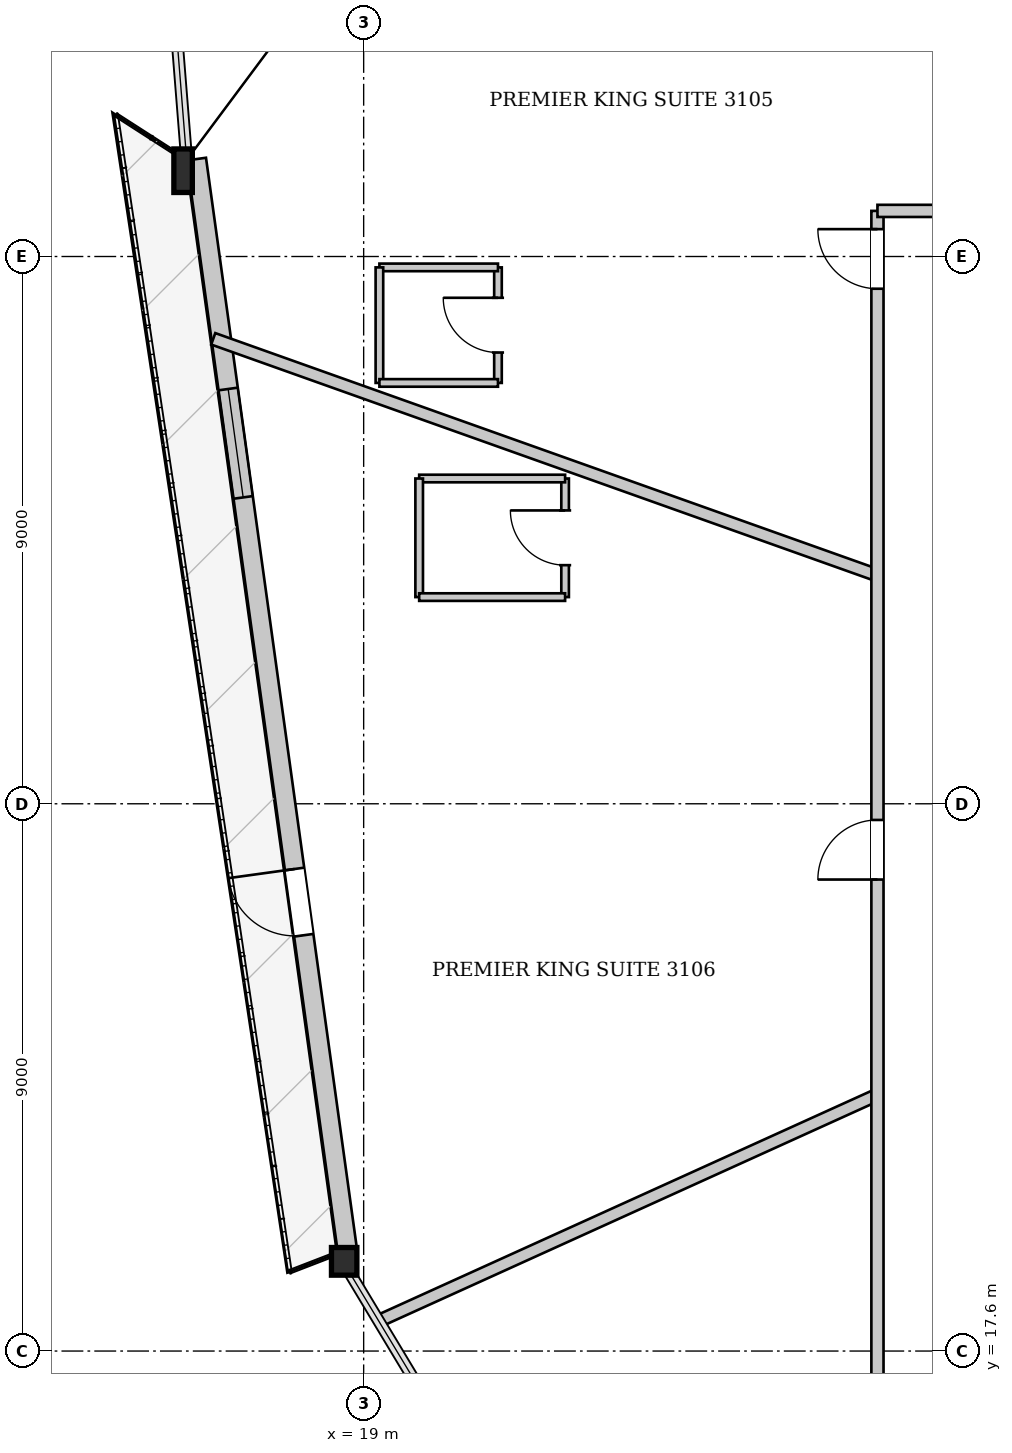
"""IFC4 building model, lengths in metres.
Left out: names, types, materials, properties, quantities, classifications, styles, units other than length and angle.
Written with IfcOpenShell. Run it as: python <this file> out.ifc"""

import sys

from ifc_helpers import new_model, si_unit, direction, frame, frame_2d, origin, origin_2d, place, context, subcontext, project, spatial, rectangle, i_section, extrude, source, transform, mapped, element, fill, save


model = new_model("IFC4")
c1 = context("Model", 3, precision=1e-05, world=origin(), true_north=direction((0.0, 1.0)))
c2 = subcontext(c1, "Body", "Model", "MODEL_VIEW")
j1 = project(units=[si_unit("LENGTHUNIT", "METRE"), si_unit("PLANEANGLEUNIT", "RADIAN")], contexts=[c1])
p1 = place(None, origin())
s1 = spatial("IfcSite", under=j1, at=p1, CompositionType="ELEMENT")
p2 = place(p1, origin())
s2 = spatial("IfcBuilding", under=s1, at=p2, CompositionType="ELEMENT")
p3 = place(p2, frame((0.0, 0.0, 119.9)))
s3 = spatial("IfcBuildingStorey", under=s2, at=p3, CompositionType="ELEMENT", Elevation=119.9)
m1 = source(origin(), c2, "Body", "SweptSolid", [
    extrude(i_section(OverallWidth=0.304, OverallDepth=0.716, WebThickness=0.021, FlangeThickness=0.04, at=origin_2d()), origin(), (0.0, 0.0, 1.0), 3.404),
])
p4 = place(p3, frame((16.09, 37.18, 0.0), z_axis=(-0.035071915278, -0.099478009184, 0.994421483299), x_axis=(0.94310325707, -0.332499994742, 0.0)))
e1 = element("IfcColumn", 1, at=p4, inside=s3, PredefinedType="COLUMN", context=c2, shape_type="MappedRepresentation", body=[
    mapped(m1, transform((0.0, 0.0, 0.0), x_axis=(1.0, 0.0, 0.0), y_axis=(0.0, 1.0, 0.0), z_axis=(0.0, 0.0, 1.0), scale=1.0)),
])
m2 = source(origin(), c2, "Body", "SweptSolid", [
    extrude(i_section(OverallWidth=0.418, OverallDepth=0.455, WebThickness=0.038, FlangeThickness=0.059, at=origin_2d()), origin(), (0.0, 0.0, 1.0), 3.402),
])
p5 = place(p3, frame((18.576, 19.21, 0.0), z_axis=(0.060711197165, -0.079441247354, 0.994989064642), x_axis=(0.794541150271, 0.607210309963, 0.0)))
e2 = element("IfcColumn", 2, at=p5, inside=s3, PredefinedType="COLUMN", context=c2, shape_type="MappedRepresentation", body=[
    mapped(m2, transform((0.0, 0.0, 0.0), x_axis=(1.0, 0.0, 0.0), y_axis=(0.0, 1.0, 0.0), z_axis=(0.0, 0.0, 1.0), scale=1.0)),
])
p6 = place(p3, frame((18.735, 19.232, 0.0), z_axis=(0.0, 0.0, 1.0), x_axis=(-0.137044979398, 0.990564825553, 0.0)))
e3 = element("IfcWall", 3, at=p6, inside=s3, PredefinedType="SOLIDWALL", context=c2, shape_type="SweptSolid", body=[
    extrude(rectangle(XDim=18.141, YDim=0.32, at=frame_2d((9.07, 0.0))), origin(), (0.0, 0.0, 1.0), 2.692),
])
p7 = place(p6, frame((5.255, 0.0, 0.0)))
e4 = element("IfcOpeningElement", 4, at=p7, cuts=e3, PredefinedType="OPENING", context=c2, shape_type="SweptSolid", body=[
    extrude(rectangle(XDim=1.1, YDim=2.3, at=frame_2d((0.55, 1.15))), frame((0.0, 0.17, 0.0), z_axis=(0.0, -1.0, 0.0), x_axis=(1.0, 0.0, 0.0)), (0.0, 0.0, 1.0), 0.34),
])
p8 = place(p6, frame((12.524, 0.0, 0.372)))
e5 = element("IfcOpeningElement", 5, at=p8, cuts=e3, PredefinedType="OPENING", context=c2, shape_type="SweptSolid", body=[
    extrude(rectangle(XDim=1.8, YDim=2.2, at=frame_2d((0.9, 1.1))), frame((0.0, 0.17, 0.0), z_axis=(0.0, -1.0, 0.0), x_axis=(1.0, 0.0, 0.0)), (0.0, 0.0, 1.0), 0.34),
])
p9 = place(p3, frame((27.45, 30.357, 0.0), z_axis=(0.0, 0.0, 1.0), x_axis=(-0.942054935906, 0.335458637891, 0.0)))
e6 = element("IfcWall", 6, at=p9, inside=s3, PredefinedType="PARTITIONING", context=c2, shape_type="SweptSolid", body=[
    extrude(rectangle(XDim=11.596, YDim=0.2, at=frame_2d((5.798, 0.0))), origin(), (0.0, 0.0, 1.0), 3.3),
])
p10 = place(p3, frame((27.45, 21.814, 0.0), z_axis=(0.0, 0.0, 1.0), x_axis=(-0.910689415533, -0.413091743366, 0.0)))
e7 = element("IfcWall", 7, at=p10, inside=s3, PredefinedType="PARTITIONING", context=c2, shape_type="SweptSolid", body=[
    extrude(rectangle(XDim=8.976, YDim=0.2, at=frame_2d((4.488, 0.0))), origin(), (0.0, 0.0, 1.0), 3.3),
])
p11 = place(p3, frame((21.209, 33.521, 0.0), z_axis=(0.0, 0.0, 1.0), x_axis=(0.0, 1.0, 0.0)))
e8 = element("IfcWall", 8, at=p11, inside=s3, PredefinedType="PARTITIONING", context=c2, shape_type="SweptSolid", body=[
    extrude(rectangle(XDim=1.9, YDim=0.125, at=frame_2d((0.95, 0.0))), origin(), (0.0, 0.0, 1.0), 3.3),
])
p12 = place(p11, frame((0.5, 0.0, 0.0)))
e9 = element("IfcOpeningElement", 9, at=p12, cuts=e8, PredefinedType="OPENING", context=c2, shape_type="SweptSolid", body=[
    extrude(rectangle(XDim=0.9, YDim=2.1, at=frame_2d((0.45, 1.05))), frame((0.0, 0.073, 0.0), z_axis=(0.0, -1.0, 0.0), x_axis=(1.0, 0.0, 0.0)), (0.0, 0.0, 1.0), 0.145),
])
p13 = place(p3, frame((21.209, 35.421, 0.0), z_axis=(0.0, 0.0, 1.0), x_axis=(-1.0, 0.0, 0.0)))
e10 = element("IfcWall", 10, at=p13, inside=s3, PredefinedType="PARTITIONING", context=c2, shape_type="SweptSolid", body=[
    extrude(rectangle(XDim=1.95, YDim=0.125, at=frame_2d((0.975, 0.0))), origin(), (0.0, 0.0, 1.0), 2.975),
])
p14 = place(p3, frame((19.259, 35.421, 0.0), z_axis=(0.0, 0.0, 1.0), x_axis=(0.0, -1.0, 0.0)))
e11 = element("IfcWall", 11, at=p14, inside=s3, PredefinedType="PARTITIONING", context=c2, shape_type="SweptSolid", body=[
    extrude(rectangle(XDim=1.9, YDim=0.125, at=frame_2d((0.95, 0.0))), origin(), (0.0, 0.0, 1.0), 3.3),
])
p15 = place(p3, frame((19.259, 33.521, 0.0), z_axis=(0.0, 0.0, 1.0), x_axis=(1.0, 0.0, 0.0)))
e12 = element("IfcWall", 12, at=p15, inside=s3, PredefinedType="PARTITIONING", context=c2, shape_type="SweptSolid", body=[
    extrude(rectangle(XDim=1.95, YDim=0.125, at=frame_2d((0.975, 0.0))), origin(), (0.0, 0.0, 1.0), 3.3),
])
p16 = place(p3, frame((22.313, 29.999, 0.0), z_axis=(0.0, 0.0, 1.0), x_axis=(0.0, 1.0, 0.0)))
e13 = element("IfcWall", 13, at=p16, inside=s3, PredefinedType="PARTITIONING", context=c2, shape_type="SweptSolid", body=[
    extrude(rectangle(XDim=1.95, YDim=0.125, at=frame_2d((0.975, 0.0))), origin(), (0.0, 0.0, 1.0), 3.045),
])
p17 = place(p16, frame((0.525, 0.0, 0.0)))
e14 = element("IfcOpeningElement", 14, at=p17, cuts=e13, PredefinedType="OPENING", context=c2, shape_type="SweptSolid", body=[
    extrude(rectangle(XDim=0.9, YDim=2.1, at=frame_2d((0.45, 1.05))), frame((0.0, 0.073, 0.0), z_axis=(0.0, -1.0, 0.0), x_axis=(1.0, 0.0, 0.0)), (0.0, 0.0, 1.0), 0.145),
])
p18 = place(p3, frame((22.313, 31.949, 0.0), z_axis=(0.0, 0.0, 1.0), x_axis=(-1.0, 0.0, 0.0)))
e15 = element("IfcWall", 15, at=p18, inside=s3, PredefinedType="PARTITIONING", context=c2, shape_type="SweptSolid", body=[
    extrude(rectangle(XDim=2.4, YDim=0.125, at=frame_2d((1.2, 0.0))), origin(), (0.0, 0.0, 1.0), 3.3),
])
p19 = place(p3, frame((19.913, 31.949, 0.0), z_axis=(0.0, 0.0, 1.0), x_axis=(0.0, -1.0, 0.0)))
e16 = element("IfcWall", 16, at=p19, inside=s3, PredefinedType="PARTITIONING", context=c2, shape_type="SweptSolid", body=[
    extrude(rectangle(XDim=1.95, YDim=0.125, at=frame_2d((0.975, 0.0))), origin(), (0.0, 0.0, 1.0), 3.3),
])
p20 = place(p3, frame((19.913, 29.999, 0.0), z_axis=(0.0, 0.0, 1.0), x_axis=(1.0, 0.0, 0.0)))
e17 = element("IfcWall", 17, at=p20, inside=s3, PredefinedType="PARTITIONING", context=c2, shape_type="SweptSolid", body=[
    extrude(rectangle(XDim=2.4, YDim=0.125, at=frame_2d((1.2, 0.0))), origin(), (0.0, 0.0, 1.0), 3.3),
])
p21 = place(p3, frame((27.45, 16.85, 0.0), z_axis=(0.0, 0.0, 1.0), x_axis=(0.0, 1.0, 0.0)))
e18 = element("IfcWall", 18, at=p21, inside=s3, PredefinedType="PARTITIONING", context=c2, shape_type="SweptSolid", body=[
    extrude(rectangle(XDim=19.5, YDim=0.2, at=frame_2d((9.75, 0.0))), origin(), (0.0, 0.0, 1.0), 3.3),
])
p22 = place(p21, frame((18.22, 0.0, 0.0)))
e19 = element("IfcOpeningElement", 19, at=p22, cuts=e18, PredefinedType="OPENING", context=c2, shape_type="SweptSolid", body=[
    extrude(rectangle(XDim=0.98, YDim=2.15, at=frame_2d((0.49, 1.075))), frame((0.0, 0.11, 0.0), z_axis=(0.0, -1.0, 0.0), x_axis=(1.0, 0.0, 0.0)), (0.0, 0.0, 1.0), 0.22),
])
p23 = place(p21, frame((8.504, 0.0, 0.0)))
e20 = element("IfcOpeningElement", 20, at=p23, cuts=e18, PredefinedType="OPENING", context=c2, shape_type="SweptSolid", body=[
    extrude(rectangle(XDim=0.98, YDim=2.15, at=frame_2d((0.49, 1.075))), frame((0.0, 0.11, 0.0), z_axis=(0.0, -1.0, 0.0), x_axis=(1.0, 0.0, 0.0)), (0.0, 0.0, 1.0), 0.22),
])
p24 = place(p3, frame((27.45, 36.35, 0.0), z_axis=(0.0, 0.0, 1.0), x_axis=(1.0, 0.0, 0.0)))
e21 = element("IfcWall", 21, at=p24, inside=s3, PredefinedType="PARTITIONING", context=c2, shape_type="SweptSolid", body=[
    extrude(rectangle(XDim=21.1, YDim=0.2, at=frame_2d((10.55, 0.0))), origin(), (0.0, 0.0, 1.0), 3.3),
])
p25 = place(p24, frame((19.579, 0.0, 0.0)))
e22 = element("IfcOpeningElement", 22, at=p25, cuts=e21, PredefinedType="OPENING", context=c2, shape_type="SweptSolid", body=[
    extrude(rectangle(XDim=0.98, YDim=2.15, at=frame_2d((0.49, 1.075))), frame((0.0, 0.11, 0.0), z_axis=(0.0, -1.0, 0.0), x_axis=(1.0, 0.0, 0.0)), (0.0, 0.0, 1.0), 0.22),
])
p26 = place(p24, frame((10.375, 0.0, 0.0)))
e23 = element("IfcOpeningElement", 23, at=p26, cuts=e21, PredefinedType="OPENING", context=c2, shape_type="SweptSolid", body=[
    extrude(rectangle(XDim=0.98, YDim=2.15, at=frame_2d((0.49, 1.075))), frame((0.0, 0.11, 0.0), z_axis=(0.0, -1.0, 0.0), x_axis=(1.0, 0.0, 0.0)), (0.0, 0.0, 1.0), 0.22),
])
m3 = source(origin(), c2, "Body", "SweptSolid", [
    extrude(rectangle(XDim=1.1, YDim=2.3, at=frame_2d((0.55, 1.15))), frame((0.0, 0.025, 0.0), z_axis=(0.0, -1.0, 0.0), x_axis=(1.0, 0.0, 0.0)), (0.0, 0.0, 1.0), 0.05),
])
p27 = place(p7, origin())
e24 = element("IfcDoor", 24, at=p27, inside=s3, OperationType="SINGLE_SWING_RIGHT", PredefinedType="DOOR", context=c2, shape_type="MappedRepresentation", body=[
    mapped(m3, transform((0.0, 0.0, 0.0), x_axis=(1.0, 0.0, 0.0), y_axis=(0.0, 1.0, 0.0), z_axis=(0.0, 0.0, 1.0), scale=1.0)),
])
fill(e4, e24)
m4 = source(origin(), c2, "Body", "SweptSolid", [
    extrude(rectangle(XDim=1.8, YDim=2.2, at=frame_2d((0.9, 1.1))), frame((0.0, 0.03, 0.0), z_axis=(0.0, -1.0, 0.0), x_axis=(1.0, 0.0, 0.0)), (0.0, 0.0, 1.0), 0.06),
])
p28 = place(p8, origin())
e25 = element("IfcWindow", 25, at=p28, inside=s3, PartitioningType="SINGLE_PANEL", PredefinedType="WINDOW", context=c2, shape_type="MappedRepresentation", body=[
    mapped(m4, transform((0.0, 0.0, 0.0), x_axis=(1.0, 0.0, 0.0), y_axis=(0.0, 1.0, 0.0), z_axis=(0.0, 0.0, 1.0), scale=1.0)),
])
fill(e5, e25)
m5 = source(origin(), c2, "Body", "SweptSolid", [
    extrude(rectangle(XDim=0.9, YDim=2.1, at=frame_2d((0.45, 1.05))), frame((0.0, 0.025, 0.0), z_axis=(0.0, -1.0, 0.0), x_axis=(1.0, 0.0, 0.0)), (0.0, 0.0, 1.0), 0.05),
])
p29 = place(p12, origin())
e26 = element("IfcDoor", 26, at=p29, inside=s3, OperationType="SINGLE_SWING_RIGHT", PredefinedType="DOOR", context=c2, shape_type="MappedRepresentation", body=[
    mapped(m5, transform((0.0, 0.0, 0.0), x_axis=(1.0, 0.0, 0.0), y_axis=(0.0, 1.0, 0.0), z_axis=(0.0, 0.0, 1.0), scale=1.0)),
])
fill(e9, e26)
p30 = place(p17, origin())
e27 = element("IfcDoor", 27, at=p30, inside=s3, OperationType="SINGLE_SWING_RIGHT", PredefinedType="DOOR", context=c2, shape_type="MappedRepresentation", body=[
    mapped(m5, transform((0.0, 0.0, 0.0), x_axis=(1.0, 0.0, 0.0), y_axis=(0.0, 1.0, 0.0), z_axis=(0.0, 0.0, 1.0), scale=1.0)),
])
fill(e14, e27)
m6 = source(origin(), c2, "Body", "SweptSolid", [
    extrude(rectangle(XDim=0.98, YDim=2.15, at=frame_2d((0.49, 1.075))), frame((0.0, 0.025, 0.0), z_axis=(0.0, -1.0, 0.0), x_axis=(1.0, 0.0, 0.0)), (0.0, 0.0, 1.0), 0.05),
])
p31 = place(p22, origin())
e28 = element("IfcDoor", 28, at=p31, inside=s3, OperationType="SINGLE_SWING_RIGHT", PredefinedType="DOOR", context=c2, shape_type="MappedRepresentation", body=[
    mapped(m6, transform((0.0, 0.0, 0.0), x_axis=(1.0, 0.0, 0.0), y_axis=(0.0, 1.0, 0.0), z_axis=(0.0, 0.0, 1.0), scale=1.0)),
])
fill(e19, e28)
p32 = place(p23, origin())
e29 = element("IfcDoor", 29, at=p32, inside=s3, OperationType="SINGLE_SWING_LEFT", PredefinedType="DOOR", context=c2, shape_type="MappedRepresentation", body=[
    mapped(m6, transform((0.0, 0.0, 0.0), x_axis=(1.0, 0.0, 0.0), y_axis=(0.0, 1.0, 0.0), z_axis=(0.0, 0.0, 1.0), scale=1.0)),
])
fill(e20, e29)
save(model, sys.argv[1])
